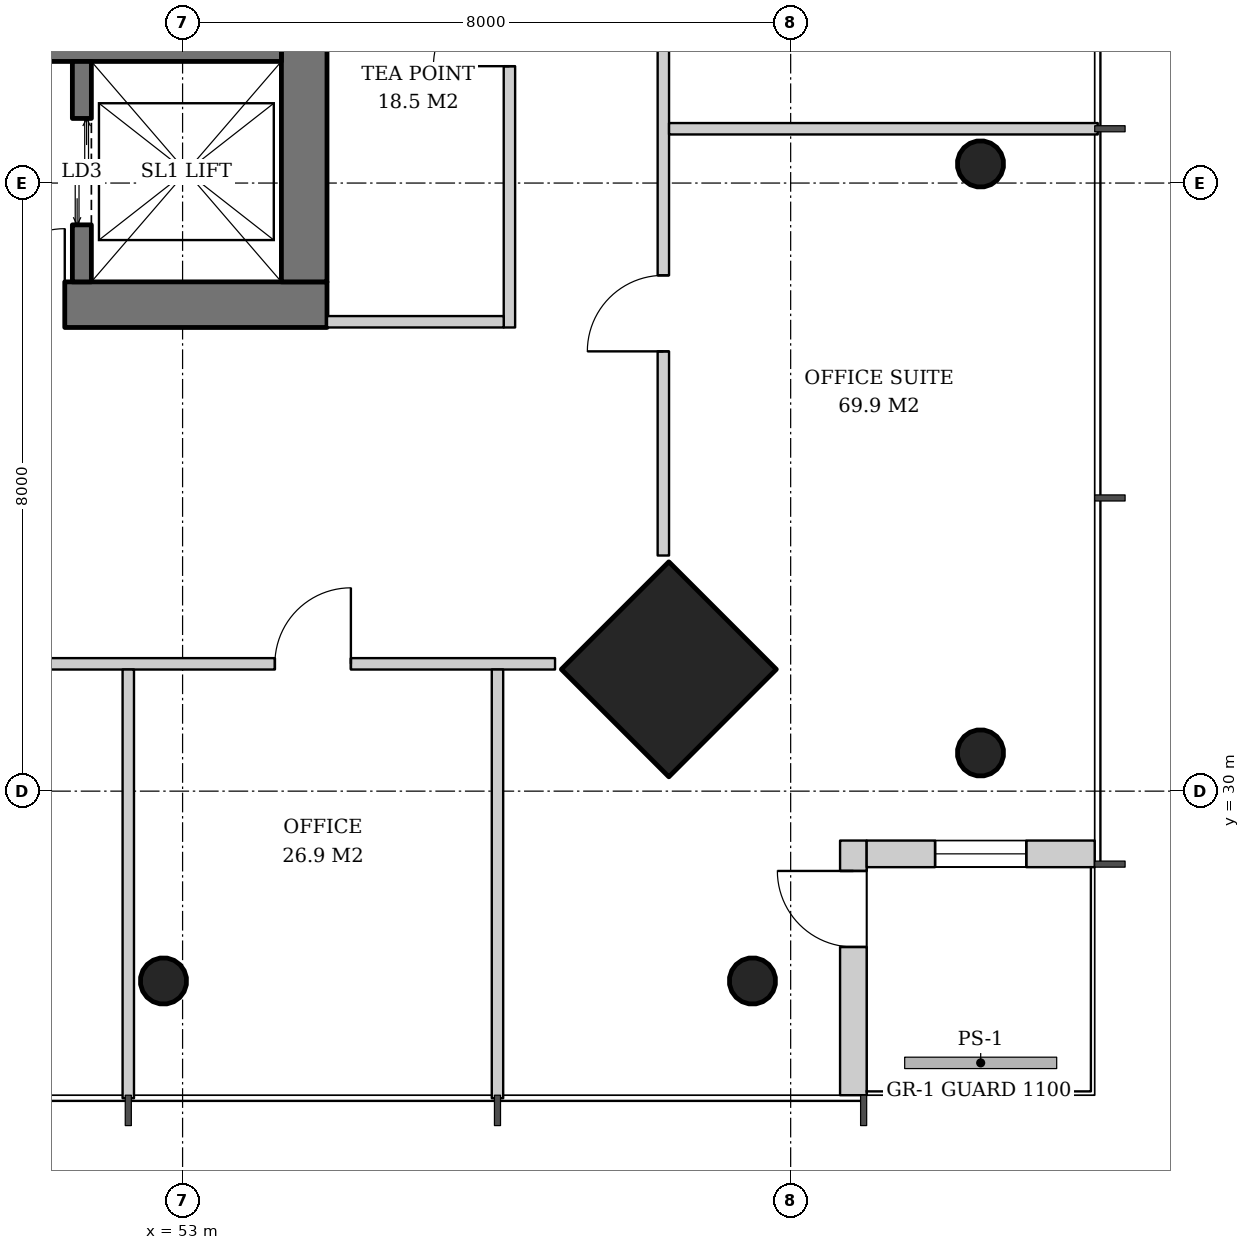
"""IFC4 building model, lengths in metres.
Left out: names, types, materials, properties, quantities, classifications, styles, units other than length and angle.
Written with IfcOpenShell. Run it as: python <this file> out.ifc"""

import sys

from ifc_helpers import new_model, si_unit, direction, frame, frame_2d, origin, origin_2d, place, context, subcontext, project, spatial, rectangle, hollow_circle, extrude, element, fill, save


model = new_model("IFC4")
c1 = context("Model", 3, precision=1e-05, world=origin(), true_north=direction((0.0, 1.0)))
c2 = subcontext(c1, "Body", "Model", "MODEL_VIEW")
j1 = project(units=[si_unit("LENGTHUNIT", "METRE"), si_unit("PLANEANGLEUNIT", "RADIAN")], contexts=[c1])
p1 = place(None, origin())
s1 = spatial("IfcSite", under=j1, at=p1, CompositionType="ELEMENT")
p2 = place(p1, origin())
s2 = spatial("IfcBuilding", under=s1, at=p2, CompositionType="ELEMENT")
p3 = place(p2, frame((0.0, 0.0, 192.0)))
s3 = spatial("IfcBuildingStorey", under=s2, at=p3, CompositionType="ELEMENT", Elevation=192.0)
p4 = place(p3, frame((63.536, 30.464, 0.0), z_axis=(-0.031898107953, 0.031898107953, 0.998981992539), x_axis=(-0.707106781187, -0.707106781187, 0.0)))
e1 = element("IfcColumn", 1, at=p4, inside=s3, PredefinedType="COLUMN", context=c2, shape_type="SweptSolid", body=[
    extrude(hollow_circle(Radius=0.305, WallThickness=0.025, at=origin_2d()), origin(), (0.0, 0.0, 1.0), 3.804),
])
p5 = place(p3, frame((63.536, 38.232, 0.0), z_axis=(-0.031910269556, 0.015987237665, 0.999362868496), x_axis=(-0.447933021895, -0.894067115991, 0.0)))
e2 = element("IfcColumn", 2, at=p5, inside=s3, PredefinedType="COLUMN", context=c2, shape_type="SweptSolid", body=[
    extrude(hollow_circle(Radius=0.305, WallThickness=0.025, at=origin_2d()), origin(), (0.0, 0.0, 1.0), 3.802),
])
p6 = place(p3, frame((59.436, 31.564, 0.0), z_axis=(-0.031962158256, 0.031962158256, 0.998977898093), x_axis=(-0.707106781187, -0.707106781187, 0.0)))
e3 = element("IfcColumn", 3, at=p6, inside=s3, PredefinedType="COLUMN", context=c2, shape_type="SweptSolid", body=[
    extrude(rectangle(XDim=2.0, YDim=2.0, at=origin_2d()), origin(), (0.0, 0.0, 1.0), 3.804),
])
p7 = place(p3, frame((60.536, 27.464, 0.0), z_axis=(-0.031898107953, 0.031898107953, 0.998981992539), x_axis=(-0.707106781187, -0.707106781187, 0.0)))
e4 = element("IfcColumn", 4, at=p7, inside=s3, PredefinedType="COLUMN", context=c2, shape_type="SweptSolid", body=[
    extrude(hollow_circle(Radius=0.305, WallThickness=0.025, at=origin_2d()), origin(), (0.0, 0.0, 1.0), 3.804),
])
p8 = place(p3, frame((52.768, 27.464, 0.0), z_axis=(-0.015987237665, 0.031910269556, 0.999362868496), x_axis=(-0.894067115991, -0.447933021895, 0.0)))
e5 = element("IfcColumn", 5, at=p8, inside=s3, PredefinedType="COLUMN", context=c2, shape_type="SweptSolid", body=[
    extrude(hollow_circle(Radius=0.305, WallThickness=0.025, at=origin_2d()), origin(), (0.0, 0.0, 1.0), 3.802),
])
p9 = place(p3, frame((35.1, 36.4, 0.0), z_axis=(0.0, 0.0, 1.0), x_axis=(1.0, 0.0, 0.0)))
e6 = element("IfcWall", 6, at=p9, inside=s3, PredefinedType="SHEAR", context=c2, shape_type="SweptSolid", body=[
    extrude(rectangle(XDim=19.8, YDim=0.6, at=frame_2d((9.9, 0.0))), origin(), (0.0, 0.0, 1.0), 3.8),
])
p10 = place(p9, frame((3.9, 0.0, 0.0)))
e7 = element("IfcOpeningElement", 7, at=p10, cuts=e6, PredefinedType="OPENING", context=c2, shape_type="SweptSolid", body=[
    extrude(rectangle(XDim=1.0, YDim=2.1, at=frame_2d((0.5, 1.05))), frame((0.0, 0.31, 0.0), z_axis=(0.0, -1.0, 0.0), x_axis=(1.0, 0.0, 0.0)), (0.0, 0.0, 1.0), 0.62),
])
p11 = place(p9, frame((15.35, 0.0, 0.0)))
e8 = element("IfcOpeningElement", 8, at=p11, cuts=e6, PredefinedType="OPENING", context=c2, shape_type="SweptSolid", body=[
    extrude(rectangle(XDim=1.0, YDim=2.1, at=frame_2d((0.5, 1.05))), frame((0.0, 0.31, 0.0), z_axis=(0.0, -1.0, 0.0), x_axis=(1.0, 0.0, 0.0)), (0.0, 0.0, 1.0), 0.62),
])
p12 = place(p3, frame((54.6, 36.7, 0.0), z_axis=(0.0, 0.0, 1.0), x_axis=(0.0, 1.0, 0.0)))
e9 = element("IfcWall", 9, at=p12, inside=s3, PredefinedType="SHEAR", context=c2, shape_type="SweptSolid", body=[
    extrude(rectangle(XDim=18.6, YDim=0.6, at=frame_2d((9.3, 0.0))), origin(), (0.0, 0.0, 1.0), 3.8),
])
p13 = place(p12, frame((8.4, 0.0, 0.0)))
e10 = element("IfcOpeningElement", 10, at=p13, cuts=e9, PredefinedType="OPENING", context=c2, shape_type="SweptSolid", body=[
    extrude(rectangle(XDim=1.8, YDim=2.4, at=frame_2d((0.9, 1.2))), frame((0.0, 0.31, 0.0), z_axis=(0.0, -1.0, 0.0), x_axis=(1.0, 0.0, 0.0)), (0.0, 0.0, 1.0), 0.62),
])
p14 = place(p3, frame((35.7, 39.8, 0.0), z_axis=(0.0, 0.0, 1.0), x_axis=(1.0, 0.0, 0.0)))
e11 = element("IfcWall", 11, at=p14, inside=s3, PredefinedType="SHEAR", context=c2, shape_type="SweptSolid", body=[
    extrude(rectangle(XDim=18.6, YDim=0.4, at=frame_2d((9.3, 0.0))), origin(), (0.0, 0.0, 1.0), 3.8),
])
p15 = place(p3, frame((61.825, 26.0, 0.0), z_axis=(0.0, 0.0, 1.0), x_axis=(0.0, 1.0, 0.0)))
e12 = element("IfcWall", 12, at=p15, inside=s3, PredefinedType="SOLIDWALL", context=c2, shape_type="SweptSolid", body=[
    extrude(rectangle(XDim=3.35, YDim=0.35, at=frame_2d((1.675, 0.0))), origin(), (0.0, 0.0, 1.0), 3.62),
])
p16 = place(p15, frame((1.95, 0.0, 0.0)))
e13 = element("IfcOpeningElement", 13, at=p16, cuts=e12, PredefinedType="OPENING", context=c2, shape_type="SweptSolid", body=[
    extrude(rectangle(XDim=1.0, YDim=2.4, at=frame_2d((0.5, 1.2))), frame((0.0, 0.185, 0.0), z_axis=(0.0, -1.0, 0.0), x_axis=(1.0, 0.0, 0.0)), (0.0, 0.0, 1.0), 0.37),
])
p17 = place(p3, frame((62.0, 29.175, 0.0), z_axis=(0.0, 0.0, 1.0), x_axis=(1.0, 0.0, 0.0)))
e14 = element("IfcWall", 14, at=p17, inside=s3, PredefinedType="SOLIDWALL", context=c2, shape_type="SweptSolid", body=[
    extrude(rectangle(XDim=3.0, YDim=0.35, at=frame_2d((1.5, 0.0))), origin(), (0.0, 0.0, 1.0), 3.62),
])
p18 = place(p17, frame((0.9, 0.0, 0.6)))
e15 = element("IfcOpeningElement", 15, at=p18, cuts=e14, PredefinedType="OPENING", context=c2, shape_type="SweptSolid", body=[
    extrude(rectangle(XDim=1.2, YDim=2.55, at=frame_2d((0.6, 1.275))), frame((0.0, 0.185, 0.0), z_axis=(0.0, -1.0, 0.0), x_axis=(1.0, 0.0, 0.0)), (0.0, 0.0, 1.0), 0.37),
])
p19 = place(p3, frame((51.675, 36.7, 0.0), z_axis=(0.0, 0.0, 1.0), x_axis=(0.0, 1.0, 0.0)))
e16 = element("IfcWall", 16, at=p19, inside=s3, PredefinedType="SHEAR", context=c2, shape_type="SweptSolid", body=[
    extrude(rectangle(XDim=2.9, YDim=0.25, at=frame_2d((1.45, 0.0))), origin(), (0.0, 0.0, 1.0), 3.8),
])
p20 = place(p19, frame((0.75, 0.0, 0.0)))
e17 = element("IfcOpeningElement", 17, at=p20, cuts=e16, PredefinedType="OPENING", context=c2, shape_type="SweptSolid", body=[
    extrude(rectangle(XDim=1.4, YDim=2.4, at=frame_2d((0.7, 1.2))), frame((0.0, 0.135, 0.0), z_axis=(0.0, -1.0, 0.0), x_axis=(1.0, 0.0, 0.0)), (0.0, 0.0, 1.0), 0.27),
])
p21 = place(p3, frame((57.3, 36.1, 0.0), z_axis=(0.0, 0.0, 1.0), x_axis=(0.0, 1.0, 0.0)))
e18 = element("IfcWall", 18, at=p21, inside=s3, PredefinedType="PARTITIONING", context=c2, shape_type="SweptSolid", body=[
    extrude(rectangle(XDim=7.875, YDim=0.15, at=frame_2d((3.938, 0.0))), origin(), (0.0, 0.0, 1.0), 2.867),
])
p22 = place(p21, frame((3.438, 0.0, 0.0)))
e19 = element("IfcOpeningElement", 19, at=p22, cuts=e18, PredefinedType="OPENING", context=c2, shape_type="SweptSolid", body=[
    extrude(rectangle(XDim=1.0, YDim=2.1, at=frame_2d((0.5, 1.05))), frame((0.0, 0.085, 0.0), z_axis=(0.0, -1.0, 0.0), x_axis=(1.0, 0.0, 0.0)), (0.0, 0.0, 1.0), 0.17),
])
p23 = place(p3, frame((54.9, 36.175, 0.0), z_axis=(0.0, 0.0, 1.0), x_axis=(1.0, 0.0, 0.0)))
e20 = element("IfcWall", 20, at=p23, inside=s3, PredefinedType="PARTITIONING", context=c2, shape_type="SweptSolid", body=[
    extrude(rectangle(XDim=2.325, YDim=0.15, at=frame_2d((1.163, 0.0))), origin(), (0.0, 0.0, 1.0), 2.867),
])
p24 = place(p3, frame((59.325, 33.1, 0.0), z_axis=(0.0, 0.0, 1.0), x_axis=(0.0, 1.0, 0.0)))
e21 = element("IfcWall", 21, at=p24, inside=s3, PredefinedType="PARTITIONING", context=c2, shape_type="SweptSolid", body=[
    extrude(rectangle(XDim=25.8, YDim=0.15, at=frame_2d((12.9, 0.0))), origin(), (0.0, 0.0, 1.0), 2.867),
])
p25 = place(p24, frame((2.686, 0.0, 0.0)))
e22 = element("IfcOpeningElement", 22, at=p25, cuts=e21, PredefinedType="OPENING", context=c2, shape_type="SweptSolid", body=[
    extrude(rectangle(XDim=1.0, YDim=2.1, at=frame_2d((0.5, 1.05))), frame((0.0, 0.085, 0.0), z_axis=(0.0, -1.0, 0.0), x_axis=(1.0, 0.0, 0.0)), (0.0, 0.0, 1.0), 0.17),
])
p26 = place(p24, frame((7.543, 0.0, 0.0)))
e23 = element("IfcOpeningElement", 23, at=p26, cuts=e21, PredefinedType="OPENING", context=c2, shape_type="SweptSolid", body=[
    extrude(rectangle(XDim=1.0, YDim=2.1, at=frame_2d((0.5, 1.05))), frame((0.0, 0.085, 0.0), z_axis=(0.0, -1.0, 0.0), x_axis=(1.0, 0.0, 0.0)), (0.0, 0.0, 1.0), 0.17),
])
p27 = place(p24, frame((12.4, 0.0, 0.0)))
e24 = element("IfcOpeningElement", 24, at=p27, cuts=e21, PredefinedType="OPENING", context=c2, shape_type="SweptSolid", body=[
    extrude(rectangle(XDim=1.0, YDim=2.1, at=frame_2d((0.5, 1.05))), frame((0.0, 0.085, 0.0), z_axis=(0.0, -1.0, 0.0), x_axis=(1.0, 0.0, 0.0)), (0.0, 0.0, 1.0), 0.17),
])
p28 = place(p24, frame((17.257, 0.0, 0.0)))
e25 = element("IfcOpeningElement", 25, at=p28, cuts=e21, PredefinedType="OPENING", context=c2, shape_type="SweptSolid", body=[
    extrude(rectangle(XDim=1.0, YDim=2.1, at=frame_2d((0.5, 1.05))), frame((0.0, 0.085, 0.0), z_axis=(0.0, -1.0, 0.0), x_axis=(1.0, 0.0, 0.0)), (0.0, 0.0, 1.0), 0.17),
])
p29 = place(p3, frame((59.4, 38.714, 0.0), z_axis=(0.0, 0.0, 1.0), x_axis=(1.0, 0.0, 0.0)))
e26 = element("IfcWall", 26, at=p29, inside=s3, PredefinedType="PARTITIONING", context=c2, shape_type="SweptSolid", body=[
    extrude(rectangle(XDim=5.64, YDim=0.15, at=frame_2d((2.82, 0.0))), origin(), (0.0, 0.0, 1.0), 3.12),
])
p30 = place(p3, frame((32.1, 31.675, 0.0), z_axis=(0.0, 0.0, 1.0), x_axis=(1.0, 0.0, 0.0)))
e27 = element("IfcWall", 27, at=p30, inside=s3, PredefinedType="PARTITIONING", context=c2, shape_type="SweptSolid", body=[
    extrude(rectangle(XDim=25.8, YDim=0.15, at=frame_2d((12.9, 0.0))), origin(), (0.0, 0.0, 1.0), 2.867),
])
p31 = place(p30, frame((2.686, 0.0, 0.0)))
e28 = element("IfcOpeningElement", 28, at=p31, cuts=e27, PredefinedType="OPENING", context=c2, shape_type="SweptSolid", body=[
    extrude(rectangle(XDim=1.0, YDim=2.1, at=frame_2d((0.5, 1.05))), frame((0.0, 0.085, 0.0), z_axis=(0.0, -1.0, 0.0), x_axis=(1.0, 0.0, 0.0)), (0.0, 0.0, 1.0), 0.17),
])
p32 = place(p30, frame((7.543, 0.0, 0.0)))
e29 = element("IfcOpeningElement", 29, at=p32, cuts=e27, PredefinedType="OPENING", context=c2, shape_type="SweptSolid", body=[
    extrude(rectangle(XDim=1.0, YDim=2.1, at=frame_2d((0.5, 1.05))), frame((0.0, 0.085, 0.0), z_axis=(0.0, -1.0, 0.0), x_axis=(1.0, 0.0, 0.0)), (0.0, 0.0, 1.0), 0.17),
])
p33 = place(p30, frame((12.4, 0.0, 0.0)))
e30 = element("IfcOpeningElement", 30, at=p33, cuts=e27, PredefinedType="OPENING", context=c2, shape_type="SweptSolid", body=[
    extrude(rectangle(XDim=1.0, YDim=2.1, at=frame_2d((0.5, 1.05))), frame((0.0, 0.085, 0.0), z_axis=(0.0, -1.0, 0.0), x_axis=(1.0, 0.0, 0.0)), (0.0, 0.0, 1.0), 0.17),
])
p34 = place(p30, frame((17.257, 0.0, 0.0)))
e31 = element("IfcOpeningElement", 31, at=p34, cuts=e27, PredefinedType="OPENING", context=c2, shape_type="SweptSolid", body=[
    extrude(rectangle(XDim=1.0, YDim=2.1, at=frame_2d((0.5, 1.05))), frame((0.0, 0.085, 0.0), z_axis=(0.0, -1.0, 0.0), x_axis=(1.0, 0.0, 0.0)), (0.0, 0.0, 1.0), 0.17),
])
p35 = place(p30, frame((22.114, 0.0, 0.0)))
e32 = element("IfcOpeningElement", 32, at=p35, cuts=e27, PredefinedType="OPENING", context=c2, shape_type="SweptSolid", body=[
    extrude(rectangle(XDim=1.0, YDim=2.1, at=frame_2d((0.5, 1.05))), frame((0.0, 0.085, 0.0), z_axis=(0.0, -1.0, 0.0), x_axis=(1.0, 0.0, 0.0)), (0.0, 0.0, 1.0), 0.17),
])
for number, where, z_axis, x_axis in (
    (33, (52.286, 31.6, 0.0), (0.0, 0.0, 1.0), (0.0, -1.0, 0.0)),
    (34, (57.143, 31.6, 0.0), (0.0, 0.0, 1.0), (0.0, -1.0, 0.0)),
):
    element("IfcWall", number, at=place(p3, frame(where, z_axis=z_axis, x_axis=x_axis)), inside=s3, PredefinedType="PARTITIONING", context=c2, shape_type="SweptSolid", body=[
        extrude(rectangle(XDim=5.64, YDim=0.15, at=frame_2d((2.82, 0.0))), origin(), (0.0, 0.0, 1.0), 3.12),
    ])
p36 = place(p16, origin())
e35 = element("IfcDoor", 35, at=p36, inside=s3, OperationType="SINGLE_SWING_RIGHT", PredefinedType="DOOR", context=c2, shape_type="SweptSolid", body=[
    extrude(rectangle(XDim=1.0, YDim=2.4, at=frame_2d((0.5, 1.2))), frame((0.0, 0.025, 0.0), z_axis=(0.0, -1.0, 0.0), x_axis=(1.0, 0.0, 0.0)), (0.0, 0.0, 1.0), 0.05),
])
fill(e13, e35)
p37 = place(p18, origin())
e36 = element("IfcWindow", 36, at=p37, inside=s3, PartitioningType="SINGLE_PANEL", PredefinedType="WINDOW", context=c2, shape_type="SweptSolid", body=[
    extrude(rectangle(XDim=1.2, YDim=2.55, at=frame_2d((0.6, 1.275))), frame((0.0, 0.03, 0.0), z_axis=(0.0, -1.0, 0.0), x_axis=(1.0, 0.0, 0.0)), (0.0, 0.0, 1.0), 0.06),
])
fill(e15, e36)
p38 = place(p20, origin())
e37 = element("IfcDoor", 37, at=p38, inside=s3, OperationType="DOUBLE_DOOR_SLIDING", PredefinedType="DOOR", context=c2, shape_type="SweptSolid", body=[
    extrude(rectangle(XDim=1.4, YDim=2.4, at=frame_2d((0.7, 1.2))), frame((0.0, 0.025, 0.0), z_axis=(0.0, -1.0, 0.0), x_axis=(1.0, 0.0, 0.0)), (0.0, 0.0, 1.0), 0.05),
])
fill(e17, e37)
p39 = place(p11, origin())
e38 = element("IfcDoor", 38, at=p39, inside=s3, OperationType="SINGLE_SWING_RIGHT", PredefinedType="DOOR", context=c2, shape_type="SweptSolid", body=[
    extrude(rectangle(XDim=1.0, YDim=2.1, at=frame_2d((0.5, 1.05))), frame((0.0, 0.025, 0.0), z_axis=(0.0, -1.0, 0.0), x_axis=(1.0, 0.0, 0.0)), (0.0, 0.0, 1.0), 0.05),
])
fill(e8, e38)
p40 = place(p22, origin())
e39 = element("IfcDoor", 39, at=p40, inside=s3, OperationType="SINGLE_SWING_LEFT", PredefinedType="DOOR", context=c2, shape_type="SweptSolid", body=[
    extrude(rectangle(XDim=1.0, YDim=2.1, at=frame_2d((0.5, 1.05))), frame((0.0, 0.025, 0.0), z_axis=(0.0, -1.0, 0.0), x_axis=(1.0, 0.0, 0.0)), (0.0, 0.0, 1.0), 0.05),
])
fill(e19, e39)
p41 = place(p25, origin())
e40 = element("IfcDoor", 40, at=p41, inside=s3, OperationType="SINGLE_SWING_LEFT", PredefinedType="DOOR", context=c2, shape_type="SweptSolid", body=[
    extrude(rectangle(XDim=1.0, YDim=2.1, at=frame_2d((0.5, 1.05))), frame((0.0, 0.025, 0.0), z_axis=(0.0, -1.0, 0.0), x_axis=(1.0, 0.0, 0.0)), (0.0, 0.0, 1.0), 0.05),
])
fill(e22, e40)
p42 = place(p35, origin())
e41 = element("IfcDoor", 41, at=p42, inside=s3, OperationType="SINGLE_SWING_RIGHT", PredefinedType="DOOR", context=c2, shape_type="SweptSolid", body=[
    extrude(rectangle(XDim=1.0, YDim=2.1, at=frame_2d((0.5, 1.05))), frame((0.0, 0.025, 0.0), z_axis=(0.0, -1.0, 0.0), x_axis=(1.0, 0.0, 0.0)), (0.0, 0.0, 1.0), 0.05),
])
fill(e32, e41)
save(model, sys.argv[1])
